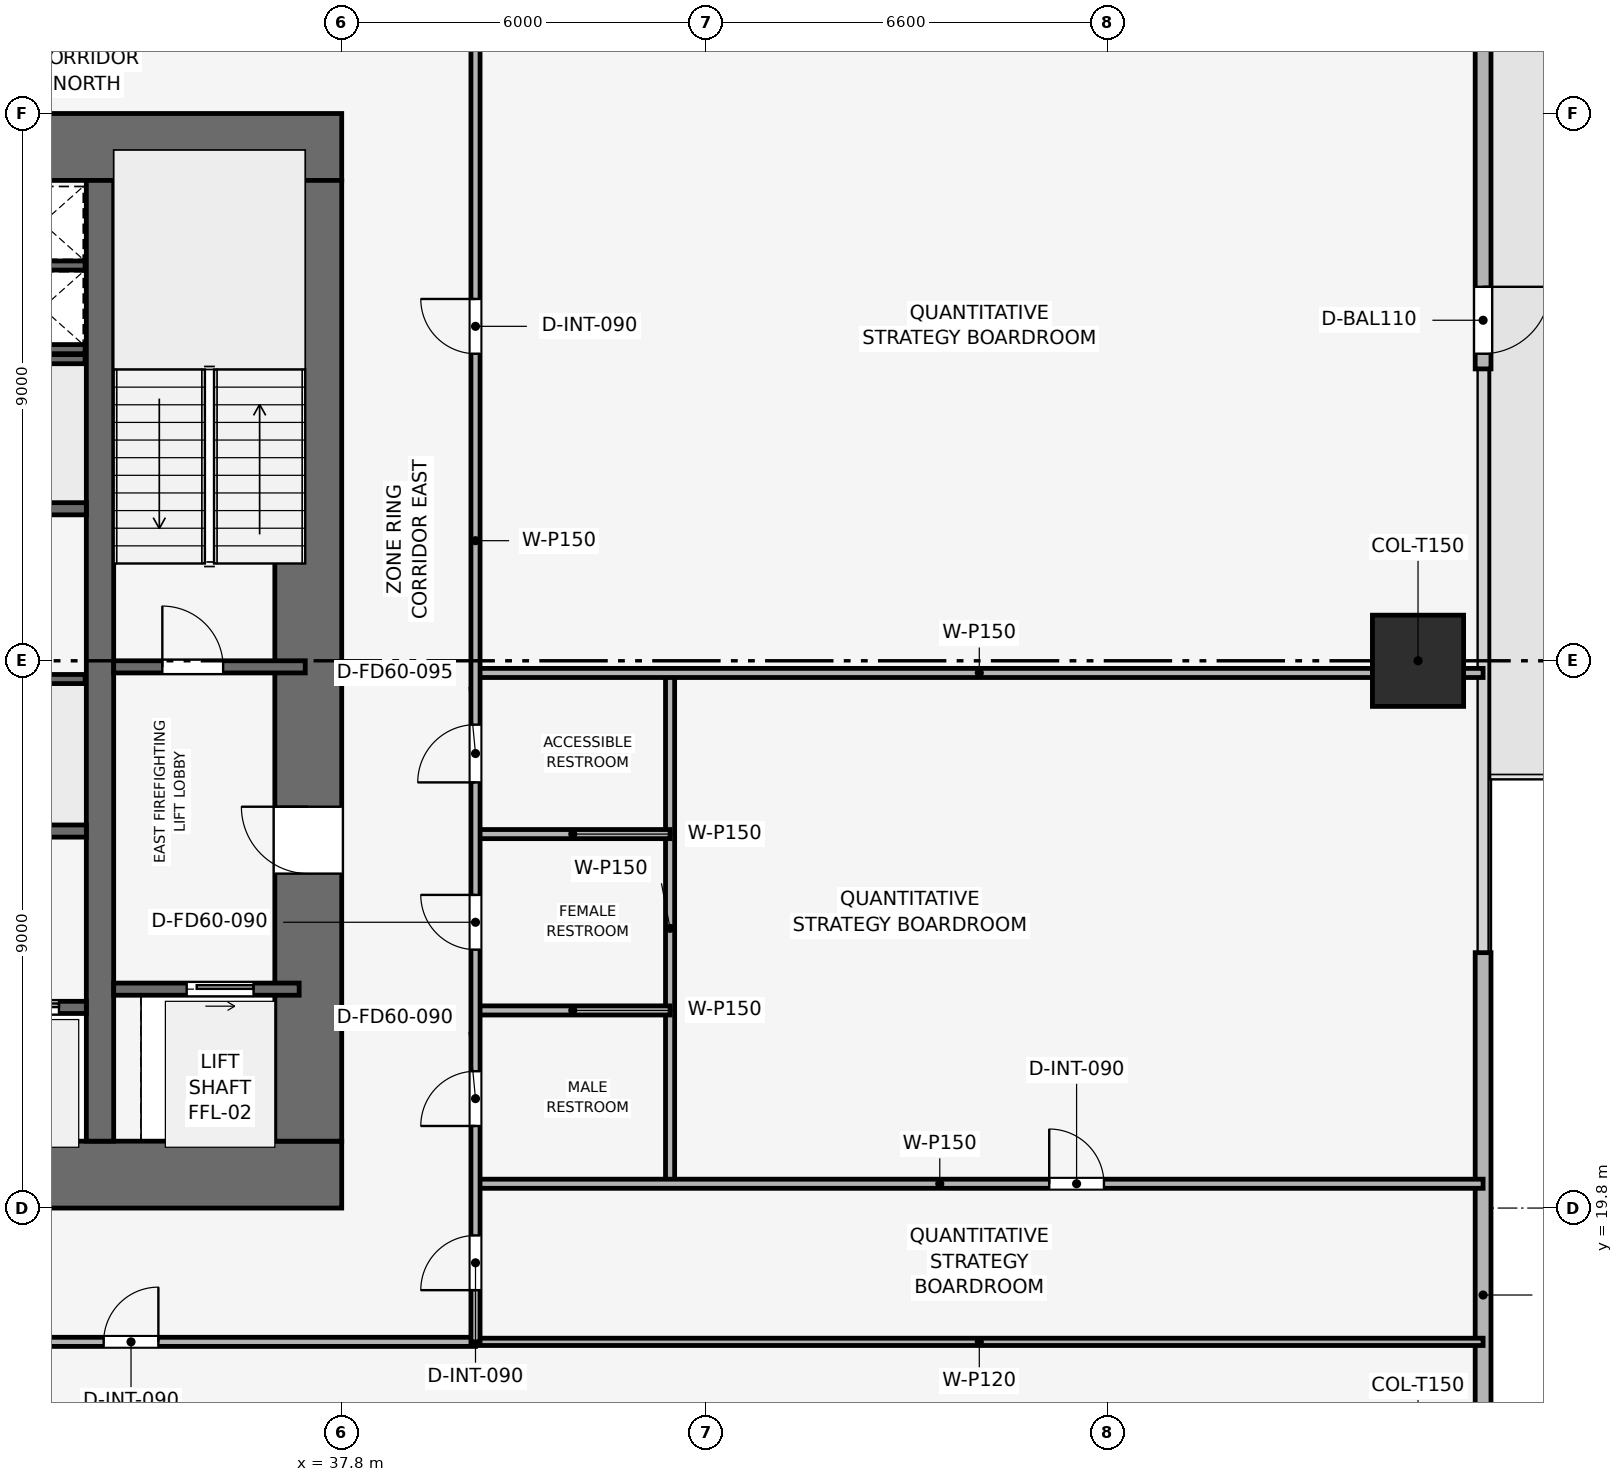
"""IFC4 building model, lengths in metres.
Left out: names, types, materials, properties, quantities, classifications, styles, units other than length and angle.
Written with IfcOpenShell. Run it as: python <this file> out.ifc"""

import sys

from ifc_helpers import new_model, si_unit, direction, frame, frame_2d, origin, origin_2d, place, context, subcontext, project, spatial, rectangle, extrude, element, fill, save


model = new_model("IFC4")
c1 = context("Model", 3, precision=1e-05, world=origin(), true_north=direction((0.0, 1.0)))
c2 = subcontext(c1, "Body", "Model", "MODEL_VIEW")
j1 = project(units=[si_unit("LENGTHUNIT", "METRE"), si_unit("PLANEANGLEUNIT", "RADIAN")], contexts=[c1])
p1 = place(None, origin())
s1 = spatial("IfcSite", under=j1, at=p1, CompositionType="ELEMENT")
p2 = place(p1, origin())
s2 = spatial("IfcBuilding", under=s1, at=p2, CompositionType="ELEMENT")
p3 = place(p2, frame((0.0, 0.0, 33.9)))
s3 = spatial("IfcBuildingStorey", under=s2, at=p3, CompositionType="ELEMENT", Elevation=33.9)
p4 = place(p3, frame((19.8, 20.35, 0.0), z_axis=(0.0, 0.0, 1.0), x_axis=(1.0, 0.0, 0.0)))
e1 = element("IfcWall", 1, at=p4, inside=s3, PredefinedType="SHEAR", context=c2, shape_type="SweptSolid", body=[
    extrude(rectangle(XDim=18.0, YDim=1.1, at=frame_2d((9.0, 0.0))), origin(), (0.0, 0.0, 1.0), 3.9),
])
p5 = place(p4, frame((8.4, 0.0, 0.0)))
e2 = element("IfcOpeningElement", 2, at=p5, cuts=e1, PredefinedType="OPENING", context=c2, shape_type="SweptSolid", body=[
    extrude(rectangle(XDim=1.2, YDim=2.2, at=frame_2d((0.6, 1.1))), frame((0.0, 0.56, 0.0), z_axis=(0.0, -1.0, 0.0), x_axis=(1.0, 0.0, 0.0)), (0.0, 0.0, 1.0), 1.12),
])
p6 = place(p3, frame((19.8, 37.25, 0.0), z_axis=(0.0, 0.0, 1.0), x_axis=(1.0, 0.0, 0.0)))
e3 = element("IfcWall", 3, at=p6, inside=s3, PredefinedType="SHEAR", context=c2, shape_type="SweptSolid", body=[
    extrude(rectangle(XDim=18.0, YDim=1.1, at=frame_2d((9.0, 0.0))), origin(), (0.0, 0.0, 1.0), 3.9),
])
p7 = place(p6, frame((7.05, 0.0, 0.0)))
e4 = element("IfcOpeningElement", 4, at=p7, cuts=e3, PredefinedType="OPENING", context=c2, shape_type="SweptSolid", body=[
    extrude(rectangle(XDim=1.1, YDim=2.15, at=frame_2d((0.55, 1.075))), frame((0.0, 0.56, 0.0), z_axis=(0.0, -1.0, 0.0), x_axis=(1.0, 0.0, 0.0)), (0.0, 0.0, 1.0), 1.12),
])
p8 = place(p3, frame((37.25, 20.9, 0.0), z_axis=(0.0, 0.0, 1.0), x_axis=(0.0, 1.0, 0.0)))
e5 = element("IfcWall", 5, at=p8, inside=s3, PredefinedType="SHEAR", context=c2, shape_type="SweptSolid", body=[
    extrude(rectangle(XDim=15.8, YDim=1.1, at=frame_2d((7.9, 0.0))), origin(), (0.0, 0.0, 1.0), 3.9),
])
p9 = place(p8, frame((4.4, 0.0, 0.0)))
e6 = element("IfcOpeningElement", 6, at=p9, cuts=e5, PredefinedType="OPENING", context=c2, shape_type="SweptSolid", body=[
    extrude(rectangle(XDim=1.1, YDim=2.15, at=frame_2d((0.55, 1.075))), frame((0.0, 0.56, 0.0), z_axis=(0.0, -1.0, 0.0), x_axis=(1.0, 0.0, 0.0)), (0.0, 0.0, 1.0), 1.12),
])
p10 = place(p3, frame((33.825, 20.9, 0.0), z_axis=(0.0, 0.0, 1.0), x_axis=(0.0, 1.0, 0.0)))
e7 = element("IfcWall", 7, at=p10, inside=s3, PredefinedType="SHEAR", context=c2, shape_type="SweptSolid", body=[
    extrude(rectangle(XDim=15.8, YDim=0.45, at=frame_2d((7.9, 0.0))), origin(), (0.0, 0.0, 1.0), 3.9),
])
p11 = place(p3, frame((55.5, 28.8, 0.003), z_axis=(0.0, 0.0, 1.0), x_axis=(1.0, 0.0, 0.0)))
e8 = element("IfcColumn", 8, at=p11, inside=s3, PredefinedType="COLUMN", context=c2, shape_type="SweptSolid", body=[
    extrude(rectangle(XDim=1.5, YDim=1.5, at=origin_2d()), origin(), (0.0, 0.0, 1.0), 3.644),
])
p12 = place(p3, frame((56.57, 48.9, 0.0), z_axis=(0.0, 0.0, 1.0), x_axis=(0.0, -1.0, 0.0)))
e9 = element("IfcWall", 9, at=p12, inside=s3, PredefinedType="SOLIDWALL", context=c2, shape_type="SweptSolid", body=[
    extrude(rectangle(XDim=15.3, YDim=0.26, at=frame_2d((7.65, 0.0))), origin(), (0.0, 0.0, 1.0), 3.65),
])
p13 = place(p12, frame((13.95, 0.0, 0.0)))
e10 = element("IfcOpeningElement", 10, at=p13, cuts=e9, PredefinedType="OPENING", context=c2, shape_type="SweptSolid", body=[
    extrude(rectangle(XDim=1.1, YDim=2.2, at=frame_2d((0.55, 1.1))), frame((0.0, 0.14, 0.0), z_axis=(0.0, -1.0, 0.0), x_axis=(1.0, 0.0, 0.0)), (0.0, 0.0, 1.0), 0.28),
])
p14 = place(p3, frame((56.57, 24.0, 0.0), z_axis=(0.0, 0.0, 1.0), x_axis=(0.0, -1.0, 0.0)))
e11 = element("IfcWall", 11, at=p14, inside=s3, PredefinedType="SOLIDWALL", context=c2, shape_type="SweptSolid", body=[
    extrude(rectangle(XDim=15.3, YDim=0.26, at=frame_2d((7.65, 0.0))), origin(), (0.0, 0.0, 1.0), 3.65),
])
p15 = place(p14, frame((11.25, 0.0, 0.9)))
e12 = element("IfcOpeningElement", 12, at=p15, cuts=e11, PredefinedType="OPENING", context=c2, shape_type="SweptSolid", body=[
    extrude(rectangle(XDim=3.8, YDim=1.9, at=frame_2d((1.9, 0.95))), frame((0.0, 0.14, 0.0), z_axis=(0.0, -1.0, 0.0), x_axis=(1.0, 0.0, 0.0)), (0.0, 0.0, 1.0), 0.28),
])
p16 = place(p3, frame((34.05, 28.7, 0.0), z_axis=(0.0, 0.0, 1.0), x_axis=(1.0, 0.0, 0.0)))
e13 = element("IfcWall", 13, at=p16, inside=s3, PredefinedType="SHEAR", context=c2, shape_type="SweptSolid", body=[
    extrude(rectangle(XDim=3.15, YDim=0.2, at=frame_2d((1.575, 0.0))), origin(), (0.0, 0.0, 1.0), 3.65),
])
p17 = place(p16, frame((0.8, 0.0, 0.0)))
e14 = element("IfcOpeningElement", 14, at=p17, cuts=e13, PredefinedType="OPENING", context=c2, shape_type="SweptSolid", body=[
    extrude(rectangle(XDim=1.0, YDim=2.1, at=frame_2d((0.5, 1.05))), frame((0.0, 0.11, 0.0), z_axis=(0.0, -1.0, 0.0), x_axis=(1.0, 0.0, 0.0)), (0.0, 0.0, 1.0), 0.22),
])
for number, where, z_axis, x_axis in (
    (15, (32.25, 33.925, 0.0), (0.0, 0.0, 1.0), (1.0, 0.0, 0.0)),
    (16, (32.25, 35.3, 0.0), (0.0, 0.0, 1.0), (1.0, 0.0, 0.0)),
):
    element("IfcWall", number, at=place(p3, frame(where, z_axis=z_axis, x_axis=x_axis)), inside=s3, PredefinedType="SHEAR", context=c2, shape_type="SweptSolid", body=[
        extrude(rectangle(XDim=1.33, YDim=0.15, at=frame_2d((0.665, 0.0))), origin(), (0.0, 0.0, 1.0), 3.65),
    ])
p18 = place(p3, frame((34.05, 23.4, 0.0), z_axis=(0.0, 0.0, 1.0), x_axis=(1.0, 0.0, 0.0)))
e17 = element("IfcWall", 17, at=p18, inside=s3, PredefinedType="SHEAR", context=c2, shape_type="SweptSolid", body=[
    extrude(rectangle(XDim=3.05, YDim=0.2, at=frame_2d((1.525, 0.0))), origin(), (0.0, 0.0, 1.0), 3.65),
])
p19 = place(p18, frame((1.2, 0.0, 0.0)))
e18 = element("IfcOpeningElement", 18, at=p19, cuts=e17, PredefinedType="OPENING", context=c2, shape_type="SweptSolid", body=[
    extrude(rectangle(XDim=1.1, YDim=2.15, at=frame_2d((0.55, 1.075))), frame((0.0, 0.11, 0.0), z_axis=(0.0, -1.0, 0.0), x_axis=(1.0, 0.0, 0.0)), (0.0, 0.0, 1.0), 0.22),
])
p20 = place(p3, frame((31.6, 23.1, 0.0), z_axis=(0.0, 0.0, 1.0), x_axis=(1.0, 0.0, 0.0)))
e19 = element("IfcWall", 19, at=p20, inside=s3, PredefinedType="SHEAR", context=c2, shape_type="SweptSolid", body=[
    extrude(rectangle(XDim=2.0, YDim=0.2, at=frame_2d((1.0, 0.0))), origin(), (0.0, 0.0, 1.0), 3.65),
])
p21 = place(p20, frame((0.45, 0.0, 0.0)))
e20 = element("IfcOpeningElement", 20, at=p21, cuts=e19, PredefinedType="OPENING", context=c2, shape_type="SweptSolid", body=[
    extrude(rectangle(XDim=1.1, YDim=2.15, at=frame_2d((0.55, 1.075))), frame((0.0, 0.11, 0.0), z_axis=(0.0, -1.0, 0.0), x_axis=(1.0, 0.0, 0.0)), (0.0, 0.0, 1.0), 0.22),
])
for number, where, z_axis, x_axis in (
    (21, (31.6, 26.0, 0.0), (0.0, 0.0, 1.0), (1.0, 0.0, 0.0)),
    (22, (31.6, 31.3, 0.0), (0.0, 0.0, 1.0), (1.0, 0.0, 0.0)),
):
    element("IfcWall", number, at=place(p3, frame(where, z_axis=z_axis, x_axis=x_axis)), inside=s3, PredefinedType="SHEAR", context=c2, shape_type="SweptSolid", body=[
        extrude(rectangle(XDim=2.0, YDim=0.2, at=frame_2d((1.0, 0.0))), origin(), (0.0, 0.0, 1.0), 3.65),
    ])
for number, where, z_axis, x_axis in (
    (23, (29.5, 28.5, 0.0), (0.0, 0.0, 1.0), (1.0, 0.0, 0.0)),
    (24, (29.5, 33.76, 0.0), (0.0, 0.0, 1.0), (1.0, 0.0, 0.0)),
):
    element("IfcWall", number, at=place(p3, frame(where, z_axis=z_axis, x_axis=x_axis)), inside=s3, PredefinedType="SHEAR", context=c2, shape_type="SweptSolid", body=[
        extrude(rectangle(XDim=4.08, YDim=0.15, at=frame_2d((2.04, 0.0))), origin(), (0.0, 0.0, 1.0), 3.65),
    ])
p22 = place(p3, frame((40.0, 17.6, 0.0), z_axis=(0.0, 0.0, 1.0), x_axis=(1.0, 0.0, 0.0)))
e25 = element("IfcWall", 25, at=p22, inside=s3, PredefinedType="PARTITIONING", context=c2, shape_type="SweptSolid", body=[
    extrude(rectangle(XDim=16.57, YDim=0.12, at=frame_2d((8.285, 0.0))), origin(), (0.0, 0.0, 1.0), 2.935),
])
p23 = place(p3, frame((43.2, 20.2, 0.0), z_axis=(0.0, 0.0, 1.0), x_axis=(0.0, 1.0, 0.0)))
e26 = element("IfcWall", 26, at=p23, inside=s3, PredefinedType="PARTITIONING", context=c2, shape_type="SweptSolid", body=[
    extrude(rectangle(XDim=8.4, YDim=0.15, at=frame_2d((4.2, 0.0))), origin(), (0.0, 0.0, 1.0), 3.085),
])
p24 = place(p3, frame((40.0, 20.2, 0.0), z_axis=(0.0, 0.0, 1.0), x_axis=(1.0, 0.0, 0.0)))
e27 = element("IfcWall", 27, at=p24, inside=s3, PredefinedType="PARTITIONING", context=c2, shape_type="SweptSolid", body=[
    extrude(rectangle(XDim=16.57, YDim=0.15, at=frame_2d((8.285, 0.0))), origin(), (0.0, 0.0, 1.0), 2.935),
])
p25 = place(p24, frame((9.435, 0.0, 0.0)))
e28 = element("IfcOpeningElement", 28, at=p25, cuts=e27, PredefinedType="OPENING", context=c2, shape_type="SweptSolid", body=[
    extrude(rectangle(XDim=0.9, YDim=2.1, at=frame_2d((0.45, 1.05))), frame((0.0, 0.085, 0.0), z_axis=(0.0, -1.0, 0.0), x_axis=(1.0, 0.0, 0.0)), (0.0, 0.0, 1.0), 0.17),
])
p26 = place(p3, frame((40.0, 28.6, 0.0), z_axis=(0.0, 0.0, 1.0), x_axis=(1.0, 0.0, 0.0)))
e29 = element("IfcWall", 29, at=p26, inside=s3, PredefinedType="PARTITIONING", context=c2, shape_type="SweptSolid", body=[
    extrude(rectangle(XDim=16.57, YDim=0.15, at=frame_2d((8.285, 0.0))), origin(), (0.0, 0.0, 1.0), 2.935),
])
for number, where, z_axis, x_axis in (
    (30, (40.0, 23.05, 0.0), (0.0, 0.0, 1.0), (1.0, 0.0, 0.0)),
    (31, (40.0, 25.95, 0.0), (0.0, 0.0, 1.0), (1.0, 0.0, 0.0)),
):
    element("IfcWall", number, at=place(p3, frame(where, z_axis=z_axis, x_axis=x_axis)), inside=s3, PredefinedType="PARTITIONING", context=c2, shape_type="SweptSolid", body=[
        extrude(rectangle(XDim=3.2, YDim=0.15, at=frame_2d((1.6, 0.0))), origin(), (0.0, 0.0, 1.0), 3.65),
    ])
p27 = place(p3, frame((17.6, 17.6, 0.0), z_axis=(0.0, 0.0, 1.0), x_axis=(1.0, 0.0, 0.0)))
e32 = element("IfcWall", 32, at=p27, inside=s3, PredefinedType="PARTITIONING", context=c2, shape_type="SweptSolid", body=[
    extrude(rectangle(XDim=22.4, YDim=0.15, at=frame_2d((11.2, 0.0))), origin(), (0.0, 0.0, 1.0), 3.085),
])
p28 = place(p27, frame((0.72, 0.0, 0.0)))
e33 = element("IfcOpeningElement", 33, at=p28, cuts=e32, PredefinedType="OPENING", context=c2, shape_type="SweptSolid", body=[
    extrude(rectangle(XDim=0.9, YDim=2.1, at=frame_2d((0.45, 1.05))), frame((0.0, 0.085, 0.0), z_axis=(0.0, -1.0, 0.0), x_axis=(1.0, 0.0, 0.0)), (0.0, 0.0, 1.0), 0.17),
])
p29 = place(p27, frame((6.255, 0.0, 0.0)))
e34 = element("IfcOpeningElement", 34, at=p29, cuts=e32, PredefinedType="OPENING", context=c2, shape_type="SweptSolid", body=[
    extrude(rectangle(XDim=0.9, YDim=2.1, at=frame_2d((0.45, 1.05))), frame((0.0, 0.085, 0.0), z_axis=(0.0, -1.0, 0.0), x_axis=(1.0, 0.0, 0.0)), (0.0, 0.0, 1.0), 0.17),
])
p30 = place(p27, frame((16.285, 0.0, 0.0)))
e35 = element("IfcOpeningElement", 35, at=p30, cuts=e32, PredefinedType="OPENING", context=c2, shape_type="SweptSolid", body=[
    extrude(rectangle(XDim=0.9, YDim=2.1, at=frame_2d((0.45, 1.05))), frame((0.0, 0.085, 0.0), z_axis=(0.0, -1.0, 0.0), x_axis=(1.0, 0.0, 0.0)), (0.0, 0.0, 1.0), 0.17),
])
p31 = place(p3, frame((40.0, 17.6, 0.0), z_axis=(0.0, 0.0, 1.0), x_axis=(0.0, 1.0, 0.0)))
e36 = element("IfcWall", 36, at=p31, inside=s3, PredefinedType="PARTITIONING", context=c2, shape_type="SweptSolid", body=[
    extrude(rectangle(XDim=22.4, YDim=0.15, at=frame_2d((11.2, 0.0))), origin(), (0.0, 0.0, 1.0), 3.085),
])
p32 = place(p31, frame((0.85, 0.0, 0.0)))
e37 = element("IfcOpeningElement", 37, at=p32, cuts=e36, PredefinedType="OPENING", context=c2, shape_type="SweptSolid", body=[
    extrude(rectangle(XDim=0.9, YDim=2.1, at=frame_2d((0.45, 1.05))), frame((0.0, 0.085, 0.0), z_axis=(0.0, -1.0, 0.0), x_axis=(1.0, 0.0, 0.0)), (0.0, 0.0, 1.0), 0.17),
])
p33 = place(p31, frame((3.55, 0.0, 0.0)))
e38 = element("IfcOpeningElement", 38, at=p33, cuts=e36, PredefinedType="OPENING", context=c2, shape_type="SweptSolid", body=[
    extrude(rectangle(XDim=0.9, YDim=2.1, at=frame_2d((0.45, 1.05))), frame((0.0, 0.085, 0.0), z_axis=(0.0, -1.0, 0.0), x_axis=(1.0, 0.0, 0.0)), (0.0, 0.0, 1.0), 0.17),
])
p34 = place(p31, frame((6.45, 0.0, 0.0)))
e39 = element("IfcOpeningElement", 39, at=p34, cuts=e36, PredefinedType="OPENING", context=c2, shape_type="SweptSolid", body=[
    extrude(rectangle(XDim=0.9, YDim=2.1, at=frame_2d((0.45, 1.05))), frame((0.0, 0.085, 0.0), z_axis=(0.0, -1.0, 0.0), x_axis=(1.0, 0.0, 0.0)), (0.0, 0.0, 1.0), 0.17),
])
p35 = place(p31, frame((9.2, 0.0, 0.0)))
e40 = element("IfcOpeningElement", 40, at=p35, cuts=e36, PredefinedType="OPENING", context=c2, shape_type="SweptSolid", body=[
    extrude(rectangle(XDim=0.95, YDim=2.1, at=frame_2d((0.475, 1.05))), frame((0.0, 0.085, 0.0), z_axis=(0.0, -1.0, 0.0), x_axis=(1.0, 0.0, 0.0)), (0.0, 0.0, 1.0), 0.17),
])
p36 = place(p31, frame((16.25, 0.0, 0.0)))
e41 = element("IfcOpeningElement", 41, at=p36, cuts=e36, PredefinedType="OPENING", context=c2, shape_type="SweptSolid", body=[
    extrude(rectangle(XDim=0.9, YDim=2.1, at=frame_2d((0.45, 1.05))), frame((0.0, 0.085, 0.0), z_axis=(0.0, -1.0, 0.0), x_axis=(1.0, 0.0, 0.0)), (0.0, 0.0, 1.0), 0.17),
])
p37 = place(p13, origin())
e42 = element("IfcDoor", 42, at=p37, inside=s3, OperationType="SINGLE_SWING_LEFT", PredefinedType="DOOR", context=c2, shape_type="SweptSolid", body=[
    extrude(rectangle(XDim=1.1, YDim=2.2, at=frame_2d((0.55, 1.1))), frame((0.0, 0.025, 0.0), z_axis=(0.0, -1.0, 0.0), x_axis=(1.0, 0.0, 0.0)), (0.0, 0.0, 1.0), 0.05),
])
fill(e10, e42)
p38 = place(p17, origin())
e43 = element("IfcDoor", 43, at=p38, inside=s3, OperationType="SINGLE_SWING_LEFT", PredefinedType="DOOR", context=c2, shape_type="SweptSolid", body=[
    extrude(rectangle(XDim=1.0, YDim=2.1, at=frame_2d((0.5, 1.05))), frame((0.0, 0.025, 0.0), z_axis=(0.0, -1.0, 0.0), x_axis=(1.0, 0.0, 0.0)), (0.0, 0.0, 1.0), 0.05),
])
fill(e14, e43)
p39 = place(p19, origin())
e44 = element("IfcDoor", 44, at=p39, inside=s3, OperationType="SLIDING_TO_RIGHT", PredefinedType="DOOR", context=c2, shape_type="SweptSolid", body=[
    extrude(rectangle(XDim=1.1, YDim=2.15, at=frame_2d((0.55, 1.075))), frame((0.0, 0.025, 0.0), z_axis=(0.0, -1.0, 0.0), x_axis=(1.0, 0.0, 0.0)), (0.0, 0.0, 1.0), 0.05),
])
fill(e18, e44)
p40 = place(p21, origin())
e45 = element("IfcDoor", 45, at=p40, inside=s3, OperationType="SLIDING_TO_RIGHT", PredefinedType="DOOR", context=c2, shape_type="SweptSolid", body=[
    extrude(rectangle(XDim=1.1, YDim=2.15, at=frame_2d((0.55, 1.075))), frame((0.0, 0.025, 0.0), z_axis=(0.0, -1.0, 0.0), x_axis=(1.0, 0.0, 0.0)), (0.0, 0.0, 1.0), 0.05),
])
fill(e20, e45)
p41 = place(p25, origin())
e46 = element("IfcDoor", 46, at=p41, inside=s3, OperationType="SINGLE_SWING_LEFT", PredefinedType="DOOR", context=c2, shape_type="SweptSolid", body=[
    extrude(rectangle(XDim=0.9, YDim=2.1, at=frame_2d((0.45, 1.05))), frame((0.0, 0.025, 0.0), z_axis=(0.0, -1.0, 0.0), x_axis=(1.0, 0.0, 0.0)), (0.0, 0.0, 1.0), 0.05),
])
fill(e28, e46)
p42 = place(p30, origin())
e47 = element("IfcDoor", 47, at=p42, inside=s3, OperationType="SINGLE_SWING_RIGHT", PredefinedType="DOOR", context=c2, shape_type="SweptSolid", body=[
    extrude(rectangle(XDim=0.9, YDim=2.1, at=frame_2d((0.45, 1.05))), frame((0.0, 0.025, 0.0), z_axis=(0.0, -1.0, 0.0), x_axis=(1.0, 0.0, 0.0)), (0.0, 0.0, 1.0), 0.05),
])
fill(e35, e47)
p43 = place(p32, origin())
e48 = element("IfcDoor", 48, at=p43, inside=s3, OperationType="SINGLE_SWING_LEFT", PredefinedType="DOOR", context=c2, shape_type="SweptSolid", body=[
    extrude(rectangle(XDim=0.9, YDim=2.1, at=frame_2d((0.45, 1.05))), frame((0.0, 0.025, 0.0), z_axis=(0.0, -1.0, 0.0), x_axis=(1.0, 0.0, 0.0)), (0.0, 0.0, 1.0), 0.05),
])
fill(e37, e48)
p44 = place(p33, origin())
e49 = element("IfcDoor", 49, at=p44, inside=s3, OperationType="SINGLE_SWING_LEFT", PredefinedType="DOOR", context=c2, shape_type="SweptSolid", body=[
    extrude(rectangle(XDim=0.9, YDim=2.1, at=frame_2d((0.45, 1.05))), frame((0.0, 0.025, 0.0), z_axis=(0.0, -1.0, 0.0), x_axis=(1.0, 0.0, 0.0)), (0.0, 0.0, 1.0), 0.05),
])
fill(e38, e49)
p45 = place(p34, origin())
e50 = element("IfcDoor", 50, at=p45, inside=s3, OperationType="SINGLE_SWING_RIGHT", PredefinedType="DOOR", context=c2, shape_type="SweptSolid", body=[
    extrude(rectangle(XDim=0.9, YDim=2.1, at=frame_2d((0.45, 1.05))), frame((0.0, 0.025, 0.0), z_axis=(0.0, -1.0, 0.0), x_axis=(1.0, 0.0, 0.0)), (0.0, 0.0, 1.0), 0.05),
])
fill(e39, e50)
p46 = place(p35, origin())
e51 = element("IfcDoor", 51, at=p46, inside=s3, OperationType="SINGLE_SWING_LEFT", PredefinedType="DOOR", context=c2, shape_type="SweptSolid", body=[
    extrude(rectangle(XDim=0.95, YDim=2.1, at=frame_2d((0.475, 1.05))), frame((0.0, 0.025, 0.0), z_axis=(0.0, -1.0, 0.0), x_axis=(1.0, 0.0, 0.0)), (0.0, 0.0, 1.0), 0.05),
])
fill(e40, e51)
p47 = place(p36, origin())
e52 = element("IfcDoor", 52, at=p47, inside=s3, OperationType="SINGLE_SWING_RIGHT", PredefinedType="DOOR", context=c2, shape_type="SweptSolid", body=[
    extrude(rectangle(XDim=0.9, YDim=2.1, at=frame_2d((0.45, 1.05))), frame((0.0, 0.025, 0.0), z_axis=(0.0, -1.0, 0.0), x_axis=(1.0, 0.0, 0.0)), (0.0, 0.0, 1.0), 0.05),
])
fill(e41, e52)
p48 = place(p9, origin())
e53 = element("IfcDoor", 53, at=p48, inside=s3, OperationType="SINGLE_SWING_RIGHT", PredefinedType="DOOR", context=c2, shape_type="SweptSolid", body=[
    extrude(rectangle(XDim=1.1, YDim=2.15, at=frame_2d((0.55, 1.075))), frame((0.0, 0.025, 0.0), z_axis=(0.0, -1.0, 0.0), x_axis=(1.0, 0.0, 0.0)), (0.0, 0.0, 1.0), 0.05),
])
fill(e6, e53)
save(model, sys.argv[1])
